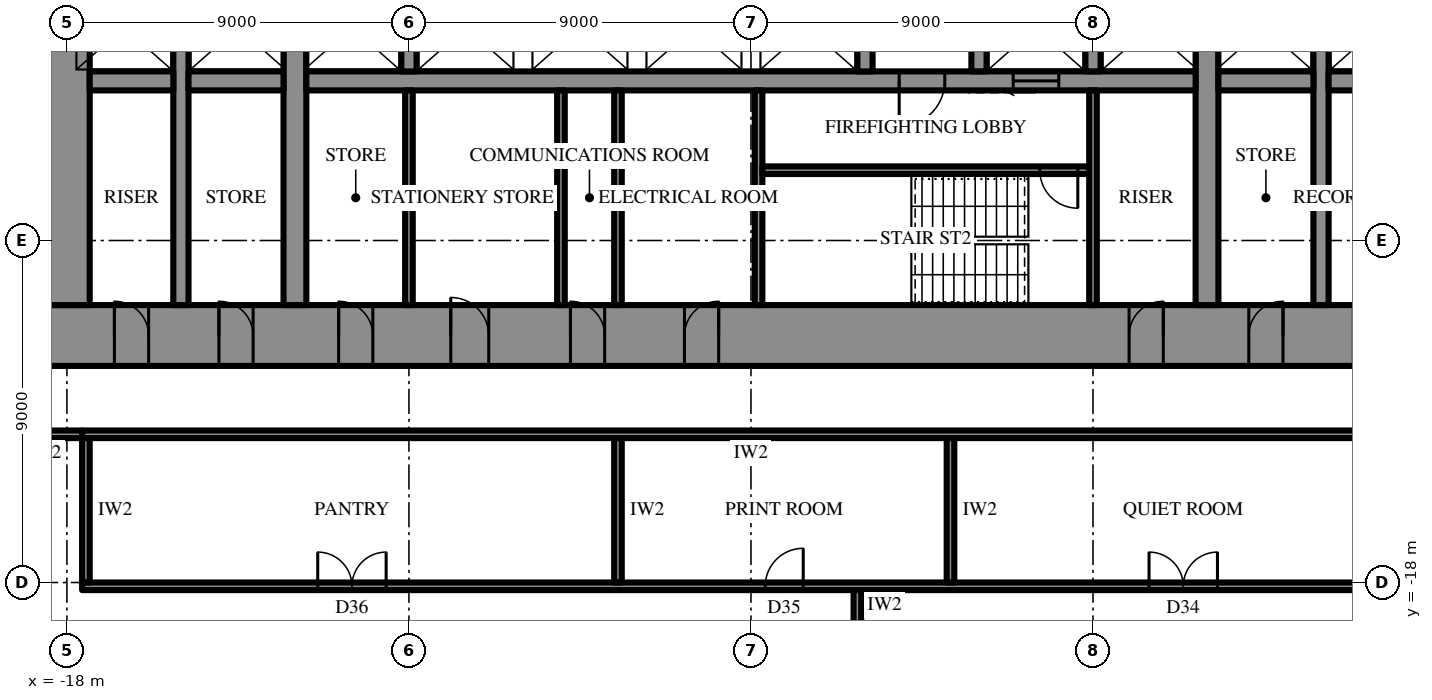
"""IFC4 building model, lengths in metres.
Left out: names, types, materials, properties, quantities, classifications, styles, units other than length and angle.
Written with IfcOpenShell. Run it as: python <this file> out.ifc"""

import sys

from ifc_helpers import new_model, si_unit, direction, frame, frame_2d, origin, place, context, subcontext, project, spatial, rectangle, extrude, element, fill, save


model = new_model("IFC4")
c1 = context("Model", 3, precision=1e-05, world=origin(), true_north=direction((0.0, 1.0)))
c2 = subcontext(c1, "Body", "Model", "MODEL_VIEW")
j1 = project(units=[si_unit("LENGTHUNIT", "METRE"), si_unit("PLANEANGLEUNIT", "RADIAN")], contexts=[c1])
p1 = place(None, origin())
s1 = spatial("IfcSite", under=j1, at=p1, CompositionType="ELEMENT")
p2 = place(p1, origin())
s2 = spatial("IfcBuilding", under=s1, at=p2, CompositionType="ELEMENT")
p3 = place(p2, frame((0.0, 0.0, 27.7)))
s3 = spatial("IfcBuildingStorey", under=s2, at=p3, CompositionType="ELEMENT", Elevation=27.7)
p4 = place(p3, frame((18.6, -11.5, 0.0), z_axis=(0.0, 0.0, 1.0), x_axis=(-1.0, 0.0, 0.0)))
e1 = element("IfcWall", 1, at=p4, inside=s3, PredefinedType="SHEAR", context=c2, shape_type="SweptSolid", body=[
    extrude(rectangle(XDim=37.2, YDim=1.6, at=frame_2d((18.6, 0.0))), origin(), (0.0, 0.0, 1.0), 4.2),
])
p5 = place(p4, frame((19.45, 0.0, 0.0)))
e2 = element("IfcOpeningElement", 2, at=p5, cuts=e1, PredefinedType="OPENING", context=c2, shape_type="SweptSolid", body=[
    extrude(rectangle(XDim=0.9, YDim=2.2, at=frame_2d((0.45, 1.1))), frame((0.0, 0.81, 0.0), z_axis=(0.0, -1.0, 0.0), x_axis=(1.0, 0.0, 0.0)), (0.0, 0.0, 1.0), 1.62),
])
p6 = place(p4, frame((22.45, 0.0, 0.0)))
e3 = element("IfcOpeningElement", 3, at=p6, cuts=e1, PredefinedType="OPENING", context=c2, shape_type="SweptSolid", body=[
    extrude(rectangle(XDim=0.9, YDim=2.2, at=frame_2d((0.45, 1.1))), frame((0.0, 0.81, 0.0), z_axis=(0.0, -1.0, 0.0), x_axis=(1.0, 0.0, 0.0)), (0.0, 0.0, 1.0), 1.62),
])
p7 = place(p4, frame((25.5, 0.0, 0.0)))
e4 = element("IfcOpeningElement", 4, at=p7, cuts=e1, PredefinedType="OPENING", context=c2, shape_type="SweptSolid", body=[
    extrude(rectangle(XDim=1.0, YDim=2.2, at=frame_2d((0.5, 1.1))), frame((0.0, 0.81, 0.0), z_axis=(0.0, -1.0, 0.0), x_axis=(1.0, 0.0, 0.0)), (0.0, 0.0, 1.0), 1.62),
])
p8 = place(p4, frame((1.85, 0.0, 0.0)))
e5 = element("IfcOpeningElement", 5, at=p8, cuts=e1, PredefinedType="OPENING", context=c2, shape_type="SweptSolid", body=[
    extrude(rectangle(XDim=0.9, YDim=2.2, at=frame_2d((0.45, 1.1))), frame((0.0, 0.81, 0.0), z_axis=(0.0, -1.0, 0.0), x_axis=(1.0, 0.0, 0.0)), (0.0, 0.0, 1.0), 1.62),
])
p9 = place(p4, frame((4.6, 0.0, 0.0)))
e6 = element("IfcOpeningElement", 6, at=p9, cuts=e1, PredefinedType="OPENING", context=c2, shape_type="SweptSolid", body=[
    extrude(rectangle(XDim=0.9, YDim=2.2, at=frame_2d((0.45, 1.1))), frame((0.0, 0.81, 0.0), z_axis=(0.0, -1.0, 0.0), x_axis=(1.0, 0.0, 0.0)), (0.0, 0.0, 1.0), 1.62),
])
p10 = place(p4, frame((7.75, 0.0, 0.0)))
e7 = element("IfcOpeningElement", 7, at=p10, cuts=e1, PredefinedType="OPENING", context=c2, shape_type="SweptSolid", body=[
    extrude(rectangle(XDim=0.9, YDim=2.2, at=frame_2d((0.45, 1.1))), frame((0.0, 0.81, 0.0), z_axis=(0.0, -1.0, 0.0), x_axis=(1.0, 0.0, 0.0)), (0.0, 0.0, 1.0), 1.62),
])
p11 = place(p4, frame((28.55, 0.0, 0.0)))
e8 = element("IfcOpeningElement", 8, at=p11, cuts=e1, PredefinedType="OPENING", context=c2, shape_type="SweptSolid", body=[
    extrude(rectangle(XDim=0.9, YDim=2.2, at=frame_2d((0.45, 1.1))), frame((0.0, 0.81, 0.0), z_axis=(0.0, -1.0, 0.0), x_axis=(1.0, 0.0, 0.0)), (0.0, 0.0, 1.0), 1.62),
])
p12 = place(p4, frame((31.7, 0.0, 0.0)))
e9 = element("IfcOpeningElement", 9, at=p12, cuts=e1, PredefinedType="OPENING", context=c2, shape_type="SweptSolid", body=[
    extrude(rectangle(XDim=0.9, YDim=2.2, at=frame_2d((0.45, 1.1))), frame((0.0, 0.81, 0.0), z_axis=(0.0, -1.0, 0.0), x_axis=(1.0, 0.0, 0.0)), (0.0, 0.0, 1.0), 1.62),
])
p13 = place(p4, frame((34.45, 0.0, 0.0)))
e10 = element("IfcOpeningElement", 10, at=p13, cuts=e1, PredefinedType="OPENING", context=c2, shape_type="SweptSolid", body=[
    extrude(rectangle(XDim=0.9, YDim=2.2, at=frame_2d((0.45, 1.1))), frame((0.0, 0.81, 0.0), z_axis=(0.0, -1.0, 0.0), x_axis=(1.0, 0.0, 0.0)), (0.0, 0.0, 1.0), 1.62),
])
p14 = place(p3, frame((-18.0, 10.7, 0.0), z_axis=(0.0, 0.0, 1.0), x_axis=(0.0, -1.0, 0.0)))
e11 = element("IfcWall", 11, at=p14, inside=s3, PredefinedType="SHEAR", context=c2, shape_type="SweptSolid", body=[
    extrude(rectangle(XDim=21.4, YDim=1.2, at=frame_2d((10.7, 0.0))), origin(), (0.0, 0.0, 1.0), 4.2),
])
p15 = place(p14, frame((9.8, 0.0, 0.0)))
e12 = element("IfcOpeningElement", 12, at=p15, cuts=e11, PredefinedType="OPENING", context=c2, shape_type="SweptSolid", body=[
    extrude(rectangle(XDim=1.8, YDim=2.4, at=frame_2d((0.9, 1.2))), frame((0.0, 0.61, 0.0), z_axis=(0.0, -1.0, 0.0), x_axis=(1.0, 0.0, 0.0)), (0.0, 0.0, 1.0), 1.22),
])
p16 = place(p3, frame((12.0, -10.7, 0.0), z_axis=(0.0, 0.0, 1.0), x_axis=(0.0, 1.0, 0.0)))
e13 = element("IfcWall", 13, at=p16, inside=s3, PredefinedType="SHEAR", context=c2, shape_type="SweptSolid", body=[
    extrude(rectangle(XDim=21.4, YDim=0.6, at=frame_2d((10.7, 0.0))), origin(), (0.0, 0.0, 1.0), 4.2),
])
p17 = place(p16, frame((9.8, 0.0, 0.0)))
e14 = element("IfcOpeningElement", 14, at=p17, cuts=e13, PredefinedType="OPENING", context=c2, shape_type="SweptSolid", body=[
    extrude(rectangle(XDim=1.8, YDim=2.4, at=frame_2d((0.9, 1.2))), frame((0.0, 0.31, 0.0), z_axis=(0.0, -1.0, 0.0), x_axis=(1.0, 0.0, 0.0)), (0.0, 0.0, 1.0), 0.62),
])
p18 = place(p3, frame((-12.0, -10.7, 0.0), z_axis=(0.0, 0.0, 1.0), x_axis=(0.0, 1.0, 0.0)))
e15 = element("IfcWall", 15, at=p18, inside=s3, PredefinedType="SHEAR", context=c2, shape_type="SweptSolid", body=[
    extrude(rectangle(XDim=21.4, YDim=0.6, at=frame_2d((10.7, 0.0))), origin(), (0.0, 0.0, 1.0), 4.2),
])
p19 = place(p18, frame((9.8, 0.0, 0.0)))
e16 = element("IfcOpeningElement", 16, at=p19, cuts=e15, PredefinedType="OPENING", context=c2, shape_type="SweptSolid", body=[
    extrude(rectangle(XDim=1.8, YDim=2.4, at=frame_2d((0.9, 1.2))), frame((0.0, 0.31, 0.0), z_axis=(0.0, -1.0, 0.0), x_axis=(1.0, 0.0, 0.0)), (0.0, 0.0, 1.0), 0.62),
])
p20 = place(p3, frame((15.0, -10.7, 0.0), z_axis=(0.0, 0.0, 1.0), x_axis=(0.0, 1.0, 0.0)))
e17 = element("IfcWall", 17, at=p20, inside=s3, PredefinedType="SHEAR", context=c2, shape_type="SweptSolid", body=[
    extrude(rectangle(XDim=21.4, YDim=0.4, at=frame_2d((10.7, 0.0))), origin(), (0.0, 0.0, 1.0), 4.2),
])
p21 = place(p20, frame((9.8, 0.0, 0.0)))
e18 = element("IfcOpeningElement", 18, at=p21, cuts=e17, PredefinedType="OPENING", context=c2, shape_type="SweptSolid", body=[
    extrude(rectangle(XDim=1.8, YDim=2.4, at=frame_2d((0.9, 1.2))), frame((0.0, 0.21, 0.0), z_axis=(0.0, -1.0, 0.0), x_axis=(1.0, 0.0, 0.0)), (0.0, 0.0, 1.0), 0.42),
])
p22 = place(p3, frame((-15.0, -10.7, 0.0), z_axis=(0.0, 0.0, 1.0), x_axis=(0.0, 1.0, 0.0)))
e19 = element("IfcWall", 19, at=p22, inside=s3, PredefinedType="SHEAR", context=c2, shape_type="SweptSolid", body=[
    extrude(rectangle(XDim=21.4, YDim=0.4, at=frame_2d((10.7, 0.0))), origin(), (0.0, 0.0, 1.0), 4.2),
])
p23 = place(p22, frame((9.8, 0.0, 0.0)))
e20 = element("IfcOpeningElement", 20, at=p23, cuts=e19, PredefinedType="OPENING", context=c2, shape_type="SweptSolid", body=[
    extrude(rectangle(XDim=1.8, YDim=2.4, at=frame_2d((0.9, 1.2))), frame((0.0, 0.21, 0.0), z_axis=(0.0, -1.0, 0.0), x_axis=(1.0, 0.0, 0.0)), (0.0, 0.0, 1.0), 0.42),
])
p24 = place(p3, frame((17.4, -4.8, 0.0), z_axis=(0.0, 0.0, 1.0), x_axis=(-1.0, 0.0, 0.0)))
e21 = element("IfcWall", 21, at=p24, inside=s3, PredefinedType="SHEAR", context=c2, shape_type="SweptSolid", body=[
    extrude(rectangle(XDim=2.2, YDim=0.5, at=frame_2d((1.1, 0.0))), origin(), (0.0, 0.0, 1.0), 4.2),
])
p25 = place(p3, frame((14.8, -4.8, 0.0), z_axis=(0.0, 0.0, 1.0), x_axis=(-1.0, 0.0, 0.0)))
e22 = element("IfcWall", 22, at=p25, inside=s3, PredefinedType="SHEAR", context=c2, shape_type="SweptSolid", body=[
    extrude(rectangle(XDim=2.5, YDim=0.5, at=frame_2d((1.25, 0.0))), origin(), (0.0, 0.0, 1.0), 4.2),
])
p26 = place(p3, frame((11.7, -4.8, 0.0), z_axis=(0.0, 0.0, 1.0), x_axis=(-1.0, 0.0, 0.0)))
e23 = element("IfcWall", 23, at=p26, inside=s3, PredefinedType="SHEAR", context=c2, shape_type="SweptSolid", body=[
    extrude(rectangle(XDim=23.4, YDim=0.5, at=frame_2d((11.7, 0.0))), origin(), (0.0, 0.0, 1.0), 4.2),
])
p27 = place(p26, frame((6.6, 0.0, 0.0)))
e24 = element("IfcOpeningElement", 24, at=p27, cuts=e23, PredefinedType="OPENING", context=c2, shape_type="SweptSolid", body=[
    extrude(rectangle(XDim=1.2, YDim=2.2, at=frame_2d((0.6, 1.1))), frame((0.0, 0.26, 0.0), z_axis=(0.0, -1.0, 0.0), x_axis=(1.0, 0.0, 0.0)), (0.0, 0.0, 1.0), 0.52),
])
p28 = place(p26, frame((3.6, 0.0, 0.0)))
e25 = element("IfcOpeningElement", 25, at=p28, cuts=e23, PredefinedType="OPENING", context=c2, shape_type="SweptSolid", body=[
    extrude(rectangle(XDim=1.2, YDim=2.2, at=frame_2d((0.6, 1.1))), frame((0.0, 0.26, 0.0), z_axis=(0.0, -1.0, 0.0), x_axis=(1.0, 0.0, 0.0)), (0.0, 0.0, 1.0), 0.52),
])
p29 = place(p3, frame((-12.3, -4.8, 0.0), z_axis=(0.0, 0.0, 1.0), x_axis=(-1.0, 0.0, 0.0)))
e26 = element("IfcWall", 26, at=p29, inside=s3, PredefinedType="SHEAR", context=c2, shape_type="SweptSolid", body=[
    extrude(rectangle(XDim=2.5, YDim=0.5, at=frame_2d((1.25, 0.0))), origin(), (0.0, 0.0, 1.0), 4.2),
])
p30 = place(p3, frame((-15.2, -4.8, 0.0), z_axis=(0.0, 0.0, 1.0), x_axis=(-1.0, 0.0, 0.0)))
e27 = element("IfcWall", 27, at=p30, inside=s3, PredefinedType="SHEAR", context=c2, shape_type="SweptSolid", body=[
    extrude(rectangle(XDim=2.2, YDim=0.5, at=frame_2d((1.1, 0.0))), origin(), (0.0, 0.0, 1.0), 4.2),
])
for number, where, z_axis, x_axis in (
    (28, (9.0, -2.25, 0.0), (0.0, 0.0, 1.0), (0.0, -1.0, 0.0)),
    (29, (6.0, -2.25, 0.0), (0.0, 0.0, 1.0), (0.0, -1.0, 0.0)),
    (30, (3.0, -2.25, 0.0), (0.0, 0.0, 1.0), (0.0, -1.0, 0.0)),
    (31, (-9.0, -2.25, 0.0), (0.0, 0.0, 1.0), (0.0, -1.0, 0.0)),
):
    element("IfcWall", number, at=place(p3, frame(where, z_axis=z_axis, x_axis=x_axis)), inside=s3, PredefinedType="SHEAR", context=c2, shape_type="SweptSolid", body=[
        extrude(rectangle(XDim=2.3, YDim=0.4, at=frame_2d((1.15, 0.0))), origin(), (0.0, 0.0, 1.0), 4.2),
    ])
p31 = place(p3, frame((0.2, -5.05, 0.0), z_axis=(0.0, 0.0, 1.0), x_axis=(0.0, -1.0, 0.0)))
e32 = element("IfcWall", 32, at=p31, inside=s3, PredefinedType="SHEAR", context=c2, shape_type="SweptSolid", body=[
    extrude(rectangle(XDim=5.65, YDim=0.2, at=frame_2d((2.825, 0.0))), origin(), (0.0, 0.0, 1.0), 4.2),
])
p32 = place(p3, frame((8.9, -7.15, 0.0), z_axis=(0.0, 0.0, 1.0), x_axis=(-1.0, 0.0, 0.0)))
e33 = element("IfcWall", 33, at=p32, inside=s3, PredefinedType="SHEAR", context=c2, shape_type="SweptSolid", body=[
    extrude(rectangle(XDim=8.6, YDim=0.2, at=frame_2d((4.3, 0.0))), origin(), (0.0, 0.0, 1.0), 4.2),
])
p33 = place(p32, frame((0.3, 0.0, 0.0)))
e34 = element("IfcOpeningElement", 34, at=p33, cuts=e33, PredefinedType="OPENING", context=c2, shape_type="SweptSolid", body=[
    extrude(rectangle(XDim=1.0, YDim=2.2, at=frame_2d((0.5, 1.1))), frame((0.0, 0.11, 0.0), z_axis=(0.0, -1.0, 0.0), x_axis=(1.0, 0.0, 0.0)), (0.0, 0.0, 1.0), 0.22),
])
for number, where, z_axis, x_axis in (
    (35, (9.0, -5.05, 0.0), (0.0, 0.0, 1.0), (0.0, -1.0, 0.0)),
    (36, (-9.0, -5.05, 0.0), (0.0, 0.0, 1.0), (0.0, -1.0, 0.0)),
    (37, (-3.5, -5.05, 0.0), (0.0, 0.0, 1.0), (0.0, -1.0, 0.0)),
    (38, (-5.0, -5.05, 0.0), (0.0, 0.0, 1.0), (0.0, -1.0, 0.0)),
):
    element("IfcWall", number, at=place(p3, frame(where, z_axis=z_axis, x_axis=x_axis)), inside=s3, PredefinedType="PARTITIONING", context=c2, shape_type="SweptSolid", body=[
        extrude(rectangle(XDim=5.65, YDim=0.2, at=frame_2d((2.825, 0.0))), origin(), (0.0, 0.0, 1.0), 4.0),
    ])
p34 = place(p3, frame((17.6, -14.1, 0.0), z_axis=(0.0, 0.0, 1.0), x_axis=(-1.0, 0.0, 0.0)))
e39 = element("IfcWall", 39, at=p34, inside=s3, PredefinedType="PARTITIONING", context=c2, shape_type="SweptSolid", body=[
    extrude(rectangle(XDim=35.2, YDim=0.2, at=frame_2d((17.6, 0.0))), origin(), (0.0, 0.0, 1.0), 4.0),
])
p35 = place(p3, frame((17.6, -18.1, 0.0), z_axis=(0.0, 0.0, 1.0), x_axis=(-1.0, 0.0, 0.0)))
e40 = element("IfcWall", 40, at=p35, inside=s3, PredefinedType="PARTITIONING", context=c2, shape_type="SweptSolid", body=[
    extrude(rectangle(XDim=35.2, YDim=0.2, at=frame_2d((17.6, 0.0))), origin(), (0.0, 0.0, 1.0), 4.0),
])
p36 = place(p35, frame((5.325, 0.0, 0.0)))
e41 = element("IfcOpeningElement", 41, at=p36, cuts=e40, PredefinedType="OPENING", context=c2, shape_type="SweptSolid", body=[
    extrude(rectangle(XDim=1.8, YDim=2.4, at=frame_2d((0.9, 1.2))), frame((0.0, 0.11, 0.0), z_axis=(0.0, -1.0, 0.0), x_axis=(1.0, 0.0, 0.0)), (0.0, 0.0, 1.0), 0.22),
])
p37 = place(p35, frame((16.225, 0.0, 0.0)))
e42 = element("IfcOpeningElement", 42, at=p37, cuts=e40, PredefinedType="OPENING", context=c2, shape_type="SweptSolid", body=[
    extrude(rectangle(XDim=1.0, YDim=2.2, at=frame_2d((0.5, 1.1))), frame((0.0, 0.11, 0.0), z_axis=(0.0, -1.0, 0.0), x_axis=(1.0, 0.0, 0.0)), (0.0, 0.0, 1.0), 0.22),
])
p38 = place(p35, frame((27.2, 0.0, 0.0)))
e43 = element("IfcOpeningElement", 43, at=p38, cuts=e40, PredefinedType="OPENING", context=c2, shape_type="SweptSolid", body=[
    extrude(rectangle(XDim=1.8, YDim=2.4, at=frame_2d((0.9, 1.2))), frame((0.0, 0.11, 0.0), z_axis=(0.0, -1.0, 0.0), x_axis=(1.0, 0.0, 0.0)), (0.0, 0.0, 1.0), 0.22),
])
p39 = place(p3, frame((5.25, -14.2, 0.0), z_axis=(0.0, 0.0, 1.0), x_axis=(0.0, -1.0, 0.0)))
e44 = element("IfcWall", 44, at=p39, inside=s3, PredefinedType="PARTITIONING", context=c2, shape_type="SweptSolid", body=[
    extrude(rectangle(XDim=3.8, YDim=0.2, at=frame_2d((1.9, 0.0))), origin(), (0.0, 0.0, 1.0), 2.944),
])
for number, where, z_axis, x_axis in (
    (45, (-3.5, -14.2, 0.0), (0.0, 0.0, 1.0), (0.0, -1.0, 0.0)),
    (46, (-17.5, -14.2, 0.0), (0.0, 0.0, 1.0), (0.0, -1.0, 0.0)),
):
    element("IfcWall", number, at=place(p3, frame(where, z_axis=z_axis, x_axis=x_axis)), inside=s3, PredefinedType="PARTITIONING", context=c2, shape_type="SweptSolid", body=[
        extrude(rectangle(XDim=3.8, YDim=0.2, at=frame_2d((1.9, 0.0))), origin(), (0.0, 0.0, 1.0), 4.0),
    ])
p40 = place(p3, frame((-17.6, -14.1, 0.0), z_axis=(0.0, 0.0, 1.0), x_axis=(-1.0, 0.0, 0.0)))
e47 = element("IfcWall", 47, at=p40, inside=s3, PredefinedType="PARTITIONING", context=c2, shape_type="SweptSolid", body=[
    extrude(rectangle(XDim=2.0, YDim=0.2, at=frame_2d((1.0, 0.0))), origin(), (0.0, 0.0, 1.0), 4.0),
])
p41 = place(p3, frame((2.8, -18.2, 0.0), z_axis=(0.0, 0.0, 1.0), x_axis=(0.0, -1.0, 0.0)))
e48 = element("IfcWall", 48, at=p41, inside=s3, PredefinedType="PARTITIONING", context=c2, shape_type="SweptSolid", body=[
    extrude(rectangle(XDim=15.6, YDim=0.2, at=frame_2d((7.8, 0.0))), origin(), (0.0, 0.0, 1.0), 2.944),
])
p42 = place(p27, origin())
e49 = element("IfcDoor", 49, at=p42, inside=s3, OperationType="SINGLE_SWING_LEFT", PredefinedType="DOOR", context=c2, shape_type="SweptSolid", body=[
    extrude(rectangle(XDim=1.2, YDim=2.2, at=frame_2d((0.6, 1.1))), frame((0.0, 0.025, 0.0), z_axis=(0.0, -1.0, 0.0), x_axis=(1.0, 0.0, 0.0)), (0.0, 0.0, 1.0), 0.05),
])
fill(e24, e49)
p43 = place(p33, origin())
e50 = element("IfcDoor", 50, at=p43, inside=s3, OperationType="SINGLE_SWING_RIGHT", PredefinedType="DOOR", context=c2, shape_type="SweptSolid", body=[
    extrude(rectangle(XDim=1.0, YDim=2.2, at=frame_2d((0.5, 1.1))), frame((0.0, 0.025, 0.0), z_axis=(0.0, -1.0, 0.0), x_axis=(1.0, 0.0, 0.0)), (0.0, 0.0, 1.0), 0.05),
])
fill(e34, e50)
p44 = place(p5, frame((0.9, 0.0, 0.0), z_axis=(0.0, 0.0, 1.0), x_axis=(-1.0, 0.0, 0.0)))
e51 = element("IfcDoor", 51, at=p44, inside=s3, OperationType="SINGLE_SWING_LEFT", PredefinedType="DOOR", context=c2, shape_type="SweptSolid", body=[
    extrude(rectangle(XDim=0.9, YDim=2.2, at=frame_2d((0.45, 1.1))), frame((0.0, 0.025, 0.0), z_axis=(0.0, -1.0, 0.0), x_axis=(1.0, 0.0, 0.0)), (0.0, 0.0, 1.0), 0.05),
])
fill(e2, e51)
p45 = place(p6, frame((0.9, 0.0, 0.0), z_axis=(0.0, 0.0, 1.0), x_axis=(-1.0, 0.0, 0.0)))
e52 = element("IfcDoor", 52, at=p45, inside=s3, OperationType="SINGLE_SWING_RIGHT", PredefinedType="DOOR", context=c2, shape_type="SweptSolid", body=[
    extrude(rectangle(XDim=0.9, YDim=2.2, at=frame_2d((0.45, 1.1))), frame((0.0, 0.025, 0.0), z_axis=(0.0, -1.0, 0.0), x_axis=(1.0, 0.0, 0.0)), (0.0, 0.0, 1.0), 0.05),
])
fill(e3, e52)
p46 = place(p7, frame((1.0, 0.0, 0.0), z_axis=(0.0, 0.0, 1.0), x_axis=(-1.0, 0.0, 0.0)))
e53 = element("IfcDoor", 53, at=p46, inside=s3, OperationType="SINGLE_SWING_RIGHT", PredefinedType="DOOR", context=c2, shape_type="SweptSolid", body=[
    extrude(rectangle(XDim=1.0, YDim=2.2, at=frame_2d((0.5, 1.1))), frame((0.0, 0.025, 0.0), z_axis=(0.0, -1.0, 0.0), x_axis=(1.0, 0.0, 0.0)), (0.0, 0.0, 1.0), 0.05),
])
fill(e4, e53)
p47 = place(p9, frame((0.9, 0.0, 0.0), z_axis=(0.0, 0.0, 1.0), x_axis=(-1.0, 0.0, 0.0)))
e54 = element("IfcDoor", 54, at=p47, inside=s3, OperationType="SINGLE_SWING_LEFT", PredefinedType="DOOR", context=c2, shape_type="SweptSolid", body=[
    extrude(rectangle(XDim=0.9, YDim=2.2, at=frame_2d((0.45, 1.1))), frame((0.0, 0.025, 0.0), z_axis=(0.0, -1.0, 0.0), x_axis=(1.0, 0.0, 0.0)), (0.0, 0.0, 1.0), 0.05),
])
fill(e6, e54)
p48 = place(p10, frame((0.9, 0.0, 0.0), z_axis=(0.0, 0.0, 1.0), x_axis=(-1.0, 0.0, 0.0)))
e55 = element("IfcDoor", 55, at=p48, inside=s3, OperationType="SINGLE_SWING_LEFT", PredefinedType="DOOR", context=c2, shape_type="SweptSolid", body=[
    extrude(rectangle(XDim=0.9, YDim=2.2, at=frame_2d((0.45, 1.1))), frame((0.0, 0.025, 0.0), z_axis=(0.0, -1.0, 0.0), x_axis=(1.0, 0.0, 0.0)), (0.0, 0.0, 1.0), 0.05),
])
fill(e7, e55)
p49 = place(p11, frame((0.9, 0.0, 0.0), z_axis=(0.0, 0.0, 1.0), x_axis=(-1.0, 0.0, 0.0)))
e56 = element("IfcDoor", 56, at=p49, inside=s3, OperationType="SINGLE_SWING_RIGHT", PredefinedType="DOOR", context=c2, shape_type="SweptSolid", body=[
    extrude(rectangle(XDim=0.9, YDim=2.2, at=frame_2d((0.45, 1.1))), frame((0.0, 0.025, 0.0), z_axis=(0.0, -1.0, 0.0), x_axis=(1.0, 0.0, 0.0)), (0.0, 0.0, 1.0), 0.05),
])
fill(e8, e56)
p50 = place(p12, frame((0.9, 0.0, 0.0), z_axis=(0.0, 0.0, 1.0), x_axis=(-1.0, 0.0, 0.0)))
e57 = element("IfcDoor", 57, at=p50, inside=s3, OperationType="SINGLE_SWING_RIGHT", PredefinedType="DOOR", context=c2, shape_type="SweptSolid", body=[
    extrude(rectangle(XDim=0.9, YDim=2.2, at=frame_2d((0.45, 1.1))), frame((0.0, 0.025, 0.0), z_axis=(0.0, -1.0, 0.0), x_axis=(1.0, 0.0, 0.0)), (0.0, 0.0, 1.0), 0.05),
])
fill(e9, e57)
p51 = place(p13, frame((0.9, 0.0, 0.0), z_axis=(0.0, 0.0, 1.0), x_axis=(-1.0, 0.0, 0.0)))
e58 = element("IfcDoor", 58, at=p51, inside=s3, OperationType="SINGLE_SWING_RIGHT", PredefinedType="DOOR", context=c2, shape_type="SweptSolid", body=[
    extrude(rectangle(XDim=0.9, YDim=2.2, at=frame_2d((0.45, 1.1))), frame((0.0, 0.025, 0.0), z_axis=(0.0, -1.0, 0.0), x_axis=(1.0, 0.0, 0.0)), (0.0, 0.0, 1.0), 0.05),
])
fill(e10, e58)
p52 = place(p28, origin())
e59 = element("IfcDoor", 59, at=p52, inside=s3, OperationType="SLIDING_TO_LEFT", PredefinedType="DOOR", context=c2, shape_type="SweptSolid", body=[
    extrude(rectangle(XDim=1.2, YDim=2.2, at=frame_2d((0.6, 1.1))), frame((0.0, 0.025, 0.0), z_axis=(0.0, -1.0, 0.0), x_axis=(1.0, 0.0, 0.0)), (0.0, 0.0, 1.0), 0.05),
])
fill(e25, e59)
p53 = place(p36, frame((1.8, 0.0, 0.0), z_axis=(0.0, 0.0, 1.0), x_axis=(-1.0, 0.0, 0.0)))
e60 = element("IfcDoor", 60, at=p53, inside=s3, OperationType="DOUBLE_DOOR_SINGLE_SWING", PredefinedType="DOOR", context=c2, shape_type="SweptSolid", body=[
    extrude(rectangle(XDim=1.8, YDim=2.4, at=frame_2d((0.9, 1.2))), frame((0.0, 0.025, 0.0), z_axis=(0.0, -1.0, 0.0), x_axis=(1.0, 0.0, 0.0)), (0.0, 0.0, 1.0), 0.05),
])
fill(e41, e60)
p54 = place(p37, frame((1.0, 0.0, 0.0), z_axis=(0.0, 0.0, 1.0), x_axis=(-1.0, 0.0, 0.0)))
e61 = element("IfcDoor", 61, at=p54, inside=s3, OperationType="SINGLE_SWING_LEFT", PredefinedType="DOOR", context=c2, shape_type="SweptSolid", body=[
    extrude(rectangle(XDim=1.0, YDim=2.2, at=frame_2d((0.5, 1.1))), frame((0.0, 0.025, 0.0), z_axis=(0.0, -1.0, 0.0), x_axis=(1.0, 0.0, 0.0)), (0.0, 0.0, 1.0), 0.05),
])
fill(e42, e61)
p55 = place(p38, frame((1.8, 0.0, 0.0), z_axis=(0.0, 0.0, 1.0), x_axis=(-1.0, 0.0, 0.0)))
e62 = element("IfcDoor", 62, at=p55, inside=s3, OperationType="DOUBLE_DOOR_SINGLE_SWING", PredefinedType="DOOR", context=c2, shape_type="SweptSolid", body=[
    extrude(rectangle(XDim=1.8, YDim=2.4, at=frame_2d((0.9, 1.2))), frame((0.0, 0.025, 0.0), z_axis=(0.0, -1.0, 0.0), x_axis=(1.0, 0.0, 0.0)), (0.0, 0.0, 1.0), 0.05),
])
fill(e43, e62)
save(model, sys.argv[1])
